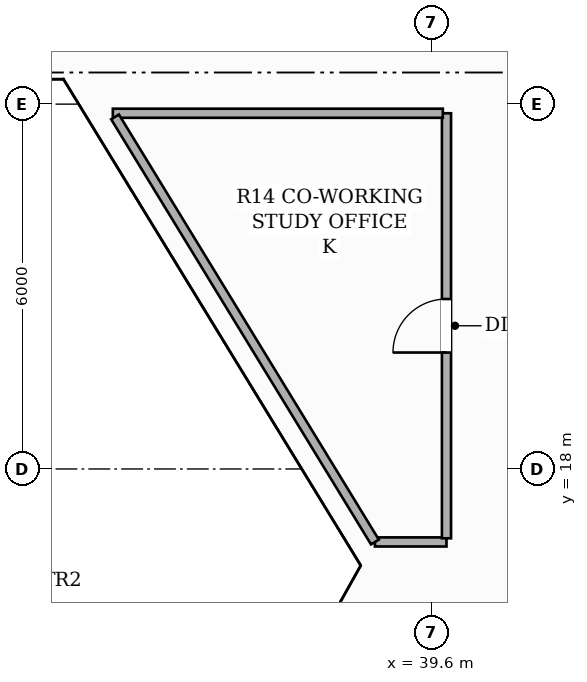
"""IFC4 building model, lengths in metres.
Left out: names, types, materials, properties, quantities, classifications, styles, units other than length and angle.
Written with IfcOpenShell. Run it as: python <this file> out.ifc"""

import sys

from ifc_helpers import new_model, si_unit, direction, frame, frame_2d, origin, place, context, subcontext, project, spatial, rectangle, extrude, element, fill, save


model = new_model("IFC4")
c1 = context("Model", 3, precision=1e-05, world=origin(), true_north=direction((0.0, 1.0)))
c2 = subcontext(c1, "Body", "Model", "MODEL_VIEW")
j1 = project(units=[si_unit("LENGTHUNIT", "METRE"), si_unit("PLANEANGLEUNIT", "RADIAN")], contexts=[c1])
p1 = place(None, origin())
s1 = spatial("IfcSite", under=j1, at=p1, CompositionType="ELEMENT")
p2 = place(p1, origin())
s2 = spatial("IfcBuilding", under=s1, at=p2, CompositionType="ELEMENT")
p3 = place(p2, frame((0.0, 0.0, 67.55)))
s3 = spatial("IfcBuildingStorey", under=s2, at=p3, CompositionType="ELEMENT", Elevation=67.55)
p4 = place(p3, frame((38.673, 16.8, 0.0), z_axis=(0.0, 0.0, 1.0), x_axis=(1.0, 0.0, 0.0)))
e1 = element("IfcWall", 1, at=p4, inside=s3, PredefinedType="PARTITIONING", context=c2, shape_type="SweptSolid", body=[
    extrude(rectangle(XDim=1.177, YDim=0.15, at=frame_2d((0.588, 0.0))), origin(), (0.0, 0.0, 1.0), 3.06),
])
p5 = place(p3, frame((39.85, 16.86, 0.0), z_axis=(0.0, 0.0, 1.0), x_axis=(0.0, 1.0, 0.0)))
e2 = element("IfcWall", 2, at=p5, inside=s3, PredefinedType="PARTITIONING", context=c2, shape_type="SweptSolid", body=[
    extrude(rectangle(XDim=6.99, YDim=0.15, at=frame_2d((3.495, 0.0))), origin(), (0.0, 0.0, 1.0), 2.669),
])
p6 = place(p5, frame((3.055, 0.0, 0.0)))
e3 = element("IfcOpeningElement", 3, at=p6, cuts=e2, PredefinedType="OPENING", context=c2, shape_type="SweptSolid", body=[
    extrude(rectangle(XDim=0.88, YDim=2.1, at=frame_2d((0.44, 1.05))), frame((0.0, 0.085, 0.0), z_axis=(0.0, -1.0, 0.0), x_axis=(1.0, 0.0, 0.0)), (0.0, 0.0, 1.0), 0.17),
])
p7 = place(p3, frame((39.79, 23.85, 0.0), z_axis=(0.0, 0.0, 1.0), x_axis=(-1.0, 0.0, 0.0)))
e4 = element("IfcWall", 4, at=p7, inside=s3, PredefinedType="PARTITIONING", context=c2, shape_type="SweptSolid", body=[
    extrude(rectangle(XDim=5.427, YDim=0.15, at=frame_2d((2.713, 0.0))), origin(), (0.0, 0.0, 1.0), 2.669),
])
p8 = place(p3, frame((34.399, 23.79, 0.0), z_axis=(0.0, 0.0, 1.0), x_axis=(0.521619930676, -0.853177969665, 0.0)))
e5 = element("IfcWall", 5, at=p8, inside=s3, PredefinedType="PARTITIONING", context=c2, shape_type="SweptSolid", body=[
    extrude(rectangle(XDim=8.194, YDim=0.15, at=frame_2d((4.097, 0.0))), origin(), (0.0, 0.0, 1.0), 2.669),
])
p9 = place(p6, origin())
e6 = element("IfcDoor", 6, at=p9, inside=s3, OperationType="SINGLE_SWING_LEFT", PredefinedType="DOOR", context=c2, shape_type="SweptSolid", body=[
    extrude(rectangle(XDim=0.88, YDim=2.1, at=frame_2d((0.44, 1.05))), frame((0.0, 0.025, 0.0), z_axis=(0.0, -1.0, 0.0), x_axis=(1.0, 0.0, 0.0)), (0.0, 0.0, 1.0), 0.05),
])
fill(e3, e6)
save(model, sys.argv[1])
